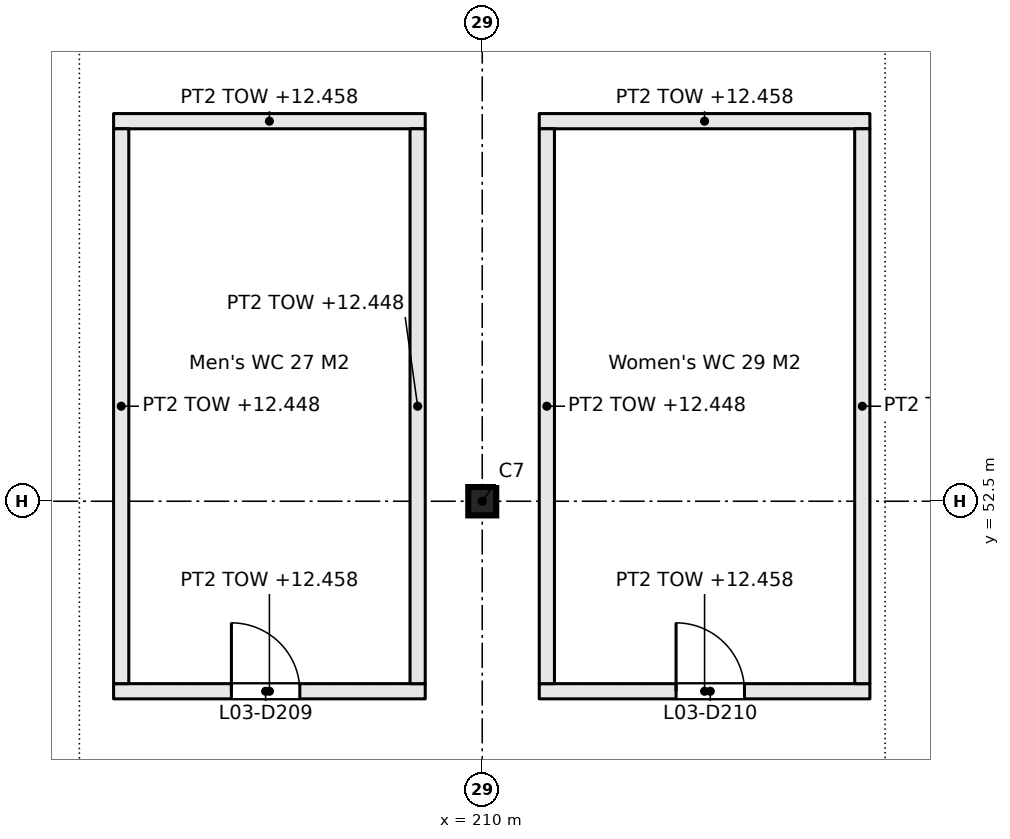
"""IFC4 building model, lengths in metres.
Left out: names, types, materials, properties, quantities, classifications, styles, units other than length and angle.
Written with IfcOpenShell. Run it as: python <this file> out.ifc"""

import sys

from ifc_helpers import new_model, si_unit, direction, frame, frame_2d, origin, origin_2d, place, context, subcontext, project, spatial, rectangle, i_section, extrude, element, fill, save


model = new_model("IFC4")
c1 = context("Model", 3, precision=1e-05, world=origin(), true_north=direction((0.0, 1.0)))
c2 = subcontext(c1, "Body", "Model", "MODEL_VIEW")
j1 = project(units=[si_unit("LENGTHUNIT", "METRE"), si_unit("PLANEANGLEUNIT", "RADIAN")], contexts=[c1])
p1 = place(None, origin())
s1 = spatial("IfcSite", under=j1, at=p1, CompositionType="ELEMENT")
p2 = place(p1, origin())
s2 = spatial("IfcBuilding", under=s1, at=p2, CompositionType="ELEMENT")
p3 = place(p2, frame((0.0, 0.0, 9.9)))
s3 = spatial("IfcBuildingStorey", under=s2, at=p3, CompositionType="ELEMENT", Elevation=9.9)
p4 = place(p3, frame((210.0, 52.5, 0.0), z_axis=(0.0, 0.0, 1.0), x_axis=(0.0, 1.0, 0.0)))
e1 = element("IfcColumn", 1, at=p4, inside=s3, PredefinedType="COLUMN", context=c2, shape_type="SweptSolid", body=[
    extrude(i_section(OverallWidth=0.373, OverallDepth=0.368, WebThickness=0.015, FlangeThickness=0.024, FilletRadius=0.015, at=origin_2d()), origin(), (0.0, 0.0, 1.0), 3.3),
])
p5 = place(p3, frame((205.15, 50.0, 0.0), z_axis=(0.0, 0.0, 1.0), x_axis=(1.0, 0.0, 0.0)))
e2 = element("IfcWall", 2, at=p5, inside=s3, PredefinedType="PARTITIONING", context=c2, shape_type="SweptSolid", body=[
    extrude(rectangle(XDim=4.1, YDim=0.2, at=frame_2d((2.05, 0.0))), origin(), (0.0, 0.0, 1.0), 2.558),
])
p6 = place(p5, frame((1.55, 0.0, 0.0)))
e3 = element("IfcOpeningElement", 3, at=p6, cuts=e2, PredefinedType="OPENING", context=c2, shape_type="SweptSolid", body=[
    extrude(rectangle(XDim=0.9, YDim=2.1, at=frame_2d((0.45, 1.05))), frame((0.0, 0.11, 0.0), z_axis=(0.0, -1.0, 0.0), x_axis=(1.0, 0.0, 0.0)), (0.0, 0.0, 1.0), 0.22),
])
p7 = place(p3, frame((210.75, 50.0, 0.0), z_axis=(0.0, 0.0, 1.0), x_axis=(1.0, 0.0, 0.0)))
e4 = element("IfcWall", 4, at=p7, inside=s3, PredefinedType="PARTITIONING", context=c2, shape_type="SweptSolid", body=[
    extrude(rectangle(XDim=4.35, YDim=0.2, at=frame_2d((2.175, 0.0))), origin(), (0.0, 0.0, 1.0), 2.558),
])
p8 = place(p7, frame((1.8, 0.0, 0.0)))
e5 = element("IfcOpeningElement", 5, at=p8, cuts=e4, PredefinedType="OPENING", context=c2, shape_type="SweptSolid", body=[
    extrude(rectangle(XDim=0.9, YDim=2.1, at=frame_2d((0.45, 1.05))), frame((0.0, 0.11, 0.0), z_axis=(0.0, -1.0, 0.0), x_axis=(1.0, 0.0, 0.0)), (0.0, 0.0, 1.0), 0.22),
])
p9 = place(p3, frame((205.15, 57.5, 0.0), z_axis=(0.0, 0.0, 1.0), x_axis=(1.0, 0.0, 0.0)))
e6 = element("IfcWall", 6, at=p9, inside=s3, PredefinedType="PARTITIONING", context=c2, shape_type="SweptSolid", body=[
    extrude(rectangle(XDim=4.1, YDim=0.2, at=frame_2d((2.05, 0.0))), origin(), (0.0, 0.0, 1.0), 2.558),
])
p10 = place(p3, frame((210.75, 57.5, 0.0), z_axis=(0.0, 0.0, 1.0), x_axis=(1.0, 0.0, 0.0)))
e7 = element("IfcWall", 7, at=p10, inside=s3, PredefinedType="PARTITIONING", context=c2, shape_type="SweptSolid", body=[
    extrude(rectangle(XDim=4.35, YDim=0.2, at=frame_2d((2.175, 0.0))), origin(), (0.0, 0.0, 1.0), 2.558),
])
for number, where, z_axis, x_axis in (
    (8, (205.25, 50.1, 0.0), (0.0, 0.0, 1.0), (0.0, 1.0, 0.0)),
    (9, (209.15, 50.1, 0.0), (0.0, 0.0, 1.0), (0.0, 1.0, 0.0)),
    (10, (210.85, 50.1, 0.0), (0.0, 0.0, 1.0), (0.0, 1.0, 0.0)),
    (11, (215.0, 50.1, 0.0), (0.0, 0.0, 1.0), (0.0, 1.0, 0.0)),
):
    element("IfcWall", number, at=place(p3, frame(where, z_axis=z_axis, x_axis=x_axis)), inside=s3, PredefinedType="PARTITIONING", context=c2, shape_type="SweptSolid", body=[
        extrude(rectangle(XDim=7.3, YDim=0.2, at=frame_2d((3.65, 0.0))), origin(), (0.0, 0.0, 1.0), 2.548),
    ])
p11 = place(p6, origin())
e12 = element("IfcDoor", 12, at=p11, inside=s3, OperationType="SINGLE_SWING_LEFT", PredefinedType="DOOR", context=c2, shape_type="SweptSolid", body=[
    extrude(rectangle(XDim=0.9, YDim=2.1, at=frame_2d((0.45, 1.05))), frame((0.0, 0.025, 0.0), z_axis=(0.0, -1.0, 0.0), x_axis=(1.0, 0.0, 0.0)), (0.0, 0.0, 1.0), 0.05),
])
fill(e3, e12)
p12 = place(p8, origin())
e13 = element("IfcDoor", 13, at=p12, inside=s3, OperationType="SINGLE_SWING_RIGHT", PredefinedType="DOOR", context=c2, shape_type="SweptSolid", body=[
    extrude(rectangle(XDim=0.9, YDim=2.1, at=frame_2d((0.45, 1.05))), frame((0.0, 0.025, 0.0), z_axis=(0.0, -1.0, 0.0), x_axis=(1.0, 0.0, 0.0)), (0.0, 0.0, 1.0), 0.05),
])
fill(e5, e13)
save(model, sys.argv[1])
